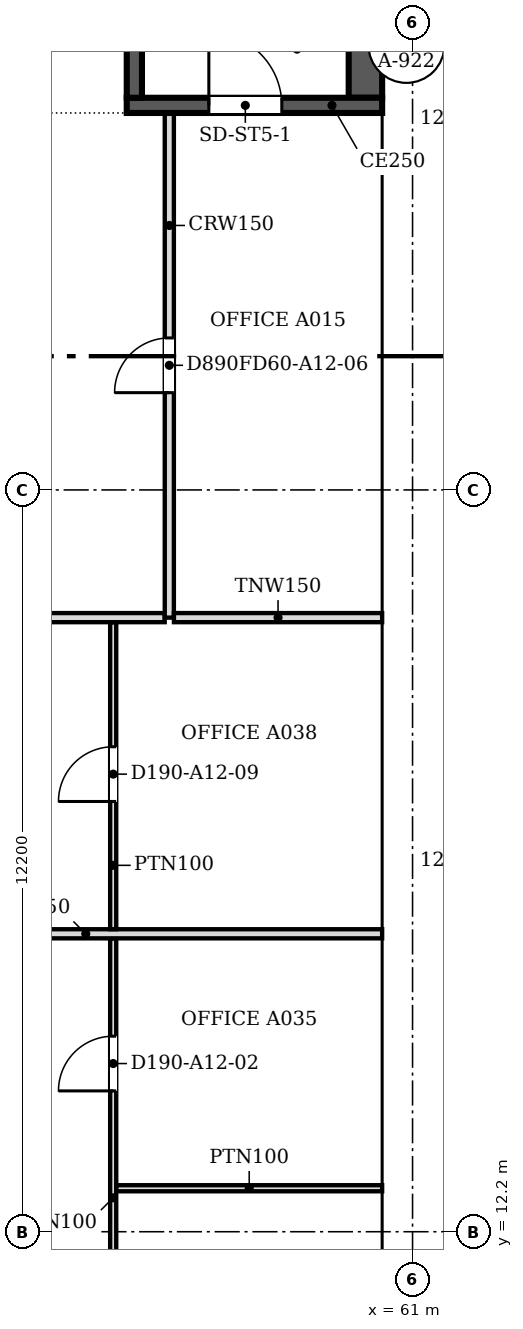
"""IFC4 building model, lengths in metres.
Left out: names, types, materials, properties, quantities, classifications, styles, units other than length and angle.
Written with IfcOpenShell. Run it as: python <this file> out.ifc"""

import sys

from ifc_helpers import new_model, si_unit, direction, frame, frame_2d, origin, place, context, subcontext, project, spatial, polyline, rectangle, outline, extrude, faceted_brep, source, transform, mapped, element, fill, save


model = new_model("IFC4")
c1 = context("Model", 3, precision=1e-05, world=origin(), true_north=direction((0.0, 1.0)))
c2 = subcontext(c1, "Body", "Model", "MODEL_VIEW")
j1 = project(units=[si_unit("LENGTHUNIT", "METRE"), si_unit("PLANEANGLEUNIT", "RADIAN")], contexts=[c1])
p1 = place(None, origin())
s1 = spatial("IfcSite", under=j1, at=p1, CompositionType="ELEMENT")
p2 = place(p1, origin())
s2 = spatial("IfcBuilding", under=s1, at=p2, CompositionType="ELEMENT")
p3 = place(p2, frame((0.0, 0.0, 139.2)))
s3 = spatial("IfcBuildingStorey", under=s2, at=p3, CompositionType="ELEMENT", Elevation=139.2)
m1 = source(origin(), c2, "Body", "SweptSolid", [
    extrude(outline(polyline([(3.05, 0.0), (6.1, 3.8), (3.05, 7.6), (0.0, 3.8), (3.05, 0.0)])), frame((0.0, 0.25, 0.0), z_axis=(0.0, -1.0, 0.0), x_axis=(1.0, 0.0, 0.0)), (0.0, 0.0, 1.0), 0.5),
])
p4 = place(p3, frame((60.75, 9.15, -3.8), z_axis=(0.0, 0.0, 1.0), x_axis=(0.0, 1.0, 0.0)))
e1 = element("IfcWall", 1, at=p4, inside=s3, PredefinedType="SOLIDWALL", context=c2, shape_type="MappedRepresentation", body=[
    mapped(m1, transform((0.0, 0.0, 0.0), scale=1.0)),
])
m2 = source(origin(), c2, "Body", "SweptSolid", [
    extrude(outline(polyline([(3.05, 0.399), (5.78, 3.8), (3.05, 7.201), (0.321, 3.8), (3.05, 0.399)])), frame((0.0, 0.26, 0.0), z_axis=(0.0, -1.0, 0.0), x_axis=(1.0, 0.0, 0.0)), (0.0, 0.0, 1.0), 0.52),
])
p5 = place(p4, origin())
e2 = element("IfcOpeningElement", 2, at=p5, cuts=e1, PredefinedType="OPENING", context=c2, shape_type="MappedRepresentation", body=[
    mapped(m2, transform((0.0, 0.0, 0.0), scale=1.0)),
])
p6 = place(p3, frame((60.75, 15.25, -3.8), z_axis=(0.0, 0.0, 1.0), x_axis=(0.0, 1.0, 0.0)))
e3 = element("IfcWall", 3, at=p6, inside=s3, PredefinedType="SOLIDWALL", context=c2, shape_type="MappedRepresentation", body=[
    mapped(m1, transform((0.0, 0.0, 0.0), scale=1.0)),
])
p7 = place(p6, origin())
e4 = element("IfcOpeningElement", 4, at=p7, cuts=e3, PredefinedType="OPENING", context=c2, shape_type="MappedRepresentation", body=[
    mapped(m2, transform((0.0, 0.0, 0.0), scale=1.0)),
])
m3 = source(origin(), c2, "Body", "Brep", [
    faceted_brep([(3.05, -0.25, 0.0), (6.1, -0.25, 3.8), (6.1, -0.25, 3.8), (3.05, -0.25, 7.6), (0.0, -0.25, 3.8), (0.0, 0.25, 3.8), (3.05, 0.25, 7.6), (6.1, 0.25, 3.8), (6.1, 0.25, 3.8), (3.05, 0.25, 0.0)], [[[0, 1, 2, 3, 4]], [[5, 6, 7, 8, 9]], [[9, 8, 1, 0]], [[7, 6, 3, 2]], [[6, 5, 4, 3]], [[5, 9, 0, 4]], [[1, 8, 7, 2]]]),
])
p8 = place(p3, frame((60.75, 21.35, -3.8), z_axis=(0.0, 0.0, 1.0), x_axis=(0.0, 1.0, 0.0)))
e5 = element("IfcWall", 5, at=p8, inside=s3, PredefinedType="SOLIDWALL", context=c2, shape_type="MappedRepresentation", body=[
    mapped(m3, transform((0.0, 0.0, 0.0), scale=1.0)),
])
p9 = place(p8, origin())
e6 = element("IfcOpeningElement", 6, at=p9, cuts=e5, PredefinedType="OPENING", context=c2, shape_type="MappedRepresentation", body=[
    mapped(m2, transform((0.0, 0.0, 0.0), scale=1.0)),
])
p10 = place(p3, frame((60.75, 27.45, -3.8), z_axis=(0.0, 0.0, 1.0), x_axis=(0.0, 1.0, 0.0)))
e7 = element("IfcWall", 7, at=p10, inside=s3, PredefinedType="SOLIDWALL", context=c2, shape_type="MappedRepresentation", body=[
    mapped(m1, transform((0.0, 0.0, 0.0), scale=1.0)),
])
p11 = place(p10, origin())
e8 = element("IfcOpeningElement", 8, at=p11, cuts=e7, PredefinedType="OPENING", context=c2, shape_type="MappedRepresentation", body=[
    mapped(m2, transform((0.0, 0.0, 0.0), scale=1.0)),
])
p12 = place(p2, frame((0.0, 0.0, 143.0)))
s4 = spatial("IfcBuildingStorey", under=s2, at=p12, CompositionType="ELEMENT", Elevation=143.0)
m4 = source(origin(), c2, "Body", "Brep", [
    faceted_brep([(3.003, -0.25, 0.0), (6.053, -0.25, 3.8), (3.003, -0.25, 7.6), (0.0, -0.25, 3.8), (0.047, 0.25, 3.859), (3.003, 0.25, 7.6), (6.053, 0.25, 3.8), (3.003, 0.25, 0.0), (0.047, 0.25, 3.741), (0.0, 0.0, 3.8)], [[[0, 1, 2, 3]], [[4, 5, 6, 7, 8]], [[7, 6, 1, 0]], [[6, 5, 2, 1]], [[5, 4, 9, 3, 2]], [[8, 7, 0, 3, 9]], [[8, 9, 4]]]),
])
p13 = place(p12, frame((60.75, 6.146, -3.8), z_axis=(0.0, 0.0, 1.0), x_axis=(0.0, 1.0, 0.0)))
e9 = element("IfcWall", 9, at=p13, inside=s4, PredefinedType="SOLIDWALL", context=c2, shape_type="MappedRepresentation", body=[
    mapped(m4, transform((0.0, 0.0, 0.0), scale=1.0)),
])
m5 = source(origin(), c2, "Body", "SweptSolid", [
    extrude(outline(polyline([(3.005, 0.401), (5.733, 3.8), (3.005, 7.199), (0.319, 3.8), (3.005, 0.401)])), frame((0.0, 0.26, 0.0), z_axis=(0.0, -1.0, 0.0), x_axis=(1.0, 0.0, 0.0)), (0.0, 0.0, 1.0), 0.52),
])
p14 = place(p13, origin())
e10 = element("IfcOpeningElement", 10, at=p14, cuts=e9, PredefinedType="OPENING", context=c2, shape_type="MappedRepresentation", body=[
    mapped(m5, transform((0.0, 0.0, 0.0), scale=1.0)),
])
p15 = place(p12, frame((60.75, 12.2, -3.8), z_axis=(0.0, 0.0, 1.0), x_axis=(0.0, 1.0, 0.0)))
e11 = element("IfcWall", 11, at=p15, inside=s4, PredefinedType="SOLIDWALL", context=c2, shape_type="MappedRepresentation", body=[
    mapped(m1, transform((0.0, 0.0, 0.0), scale=1.0)),
])
p16 = place(p15, origin())
e12 = element("IfcOpeningElement", 12, at=p16, cuts=e11, PredefinedType="OPENING", context=c2, shape_type="MappedRepresentation", body=[
    mapped(m2, transform((0.0, 0.0, 0.0), scale=1.0)),
])
p17 = place(p12, frame((60.75, 18.3, -3.8), z_axis=(0.0, 0.0, 1.0), x_axis=(0.0, 1.0, 0.0)))
e13 = element("IfcWall", 13, at=p17, inside=s4, PredefinedType="SOLIDWALL", context=c2, shape_type="MappedRepresentation", body=[
    mapped(m3, transform((0.0, 0.0, 0.0), scale=1.0)),
])
p18 = place(p17, origin())
e14 = element("IfcOpeningElement", 14, at=p18, cuts=e13, PredefinedType="OPENING", context=c2, shape_type="MappedRepresentation", body=[
    mapped(m2, transform((0.0, 0.0, 0.0), scale=1.0)),
])
p19 = place(p12, frame((60.75, 24.4, -3.8), z_axis=(0.0, 0.0, 1.0), x_axis=(0.0, 1.0, 0.0)))
e15 = element("IfcWall", 15, at=p19, inside=s4, PredefinedType="SOLIDWALL", context=c2, shape_type="MappedRepresentation", body=[
    mapped(m1, transform((0.0, 0.0, 0.0), scale=1.0)),
])
p20 = place(p19, origin())
e16 = element("IfcOpeningElement", 16, at=p20, cuts=e15, PredefinedType="OPENING", context=c2, shape_type="MappedRepresentation", body=[
    mapped(m2, transform((0.0, 0.0, 0.0), scale=1.0)),
])
p21 = place(p12, frame((60.75, 30.5, -3.8), z_axis=(0.0, 0.0, 1.0), x_axis=(0.0, 1.0, 0.0)))
e17 = element("IfcWall", 17, at=p21, inside=s4, PredefinedType="SOLIDWALL", context=c2, shape_type="MappedRepresentation", body=[
    mapped(m1, transform((0.0, 0.0, 0.0), scale=1.0)),
])
p22 = place(p21, origin())
e18 = element("IfcOpeningElement", 18, at=p22, cuts=e17, PredefinedType="OPENING", context=c2, shape_type="MappedRepresentation", body=[
    mapped(m2, transform((0.0, 0.0, 0.0), scale=1.0)),
])
p23 = place(p3, frame((60.5, 30.725, 0.0), z_axis=(0.0, 0.0, 1.0), x_axis=(-1.0, 0.0, 0.0)))
e19 = element("IfcWall", 19, at=p23, inside=s3, PredefinedType="SOLIDWALL", context=c2, shape_type="SweptSolid", body=[
    extrude(rectangle(XDim=4.2, YDim=0.25, at=frame_2d((2.1, 0.0))), origin(), (0.0, 0.0, 1.0), 3.8),
])
m6 = source(origin(), c2, "Body", "SweptSolid", [
    extrude(rectangle(XDim=1.2, YDim=2.1, at=frame_2d((0.6, 1.05))), frame((0.0, 0.135, 0.0), z_axis=(0.0, -1.0, 0.0), x_axis=(1.0, 0.0, 0.0)), (0.0, 0.0, 1.0), 0.27),
])
p24 = place(p23, frame((1.65, 0.0, 0.0)))
e20 = element("IfcOpeningElement", 20, at=p24, cuts=e19, PredefinedType="OPENING", context=c2, shape_type="MappedRepresentation", body=[
    mapped(m6, transform((0.0, 0.0, 0.0), scale=1.0)),
])
p25 = place(p3, frame((56.425, 30.85, 0.0), z_axis=(0.0, 0.0, 1.0), x_axis=(0.0, 1.0, 0.0)))
e21 = element("IfcWall", 21, at=p25, inside=s3, PredefinedType="SOLIDWALL", context=c2, shape_type="SweptSolid", body=[
    extrude(rectangle(XDim=8.0, YDim=0.25, at=frame_2d((4.0, 0.0))), origin(), (0.0, 0.0, 1.0), 3.8),
])
p26 = place(p3, frame((60.225, 38.85, 0.0), z_axis=(0.0, 0.0, 1.0), x_axis=(0.0, -1.0, 0.0)))
e22 = element("IfcWall", 22, at=p26, inside=s3, PredefinedType="SOLIDWALL", context=c2, shape_type="SweptSolid", body=[
    extrude(rectangle(XDim=8.0, YDim=0.55, at=frame_2d((4.0, 0.0))), origin(), (0.0, 0.0, 1.0), 3.8),
])
p27 = place(p3, frame((56.077, 17.024, 0.0), z_axis=(0.0, 0.0, 1.0), x_axis=(0.0, -1.0, 0.0)))
e23 = element("IfcWall", 23, at=p27, inside=s3, PredefinedType="PARTITIONING", context=c2, shape_type="SweptSolid", body=[
    extrude(rectangle(XDim=8.924, YDim=0.1, at=frame_2d((4.462, 0.0))), origin(), (0.0, 0.0, 1.0), 3.067),
])
m7 = source(origin(), c2, "Body", "SweptSolid", [
    extrude(rectangle(XDim=0.9, YDim=2.1, at=frame_2d((0.45, 1.05))), frame((0.0, 0.06, 0.0), z_axis=(0.0, -1.0, 0.0), x_axis=(1.0, 0.0, 0.0)), (0.0, 0.0, 1.0), 0.12),
])
p28 = place(p27, frame((1.608, 0.0, 0.0)))
e24 = element("IfcOpeningElement", 24, at=p28, cuts=e23, PredefinedType="OPENING", context=c2, shape_type="MappedRepresentation", body=[
    mapped(m7, transform((0.0, 0.0, 0.0), scale=1.0)),
])
p29 = place(p27, frame((6.024, 0.0, 0.0)))
e25 = element("IfcOpeningElement", 25, at=p29, cuts=e23, PredefinedType="OPENING", context=c2, shape_type="MappedRepresentation", body=[
    mapped(m7, transform((0.0, 0.0, 0.0), scale=1.0)),
])
p30 = place(p3, frame((56.128, 12.915, 0.0), z_axis=(0.0, 0.0, 1.0), x_axis=(1.0, 0.0, 0.0)))
e26 = element("IfcWall", 26, at=p30, inside=s3, PredefinedType="PARTITIONING", context=c2, shape_type="SweptSolid", body=[
    extrude(rectangle(XDim=4.372, YDim=0.1, at=frame_2d((2.186, 0.0))), origin(), (0.0, 0.0, 1.0), 3.067),
])
p31 = place(p3, frame((50.751, 17.1, 0.0), z_axis=(0.0, 0.0, 1.0), x_axis=(1.0, 0.0, 0.0)))
e27 = element("IfcWall", 27, at=p31, inside=s3, PredefinedType="PARTITIONING", context=c2, shape_type="SweptSolid", body=[
    extrude(rectangle(XDim=9.749, YDim=0.15, at=frame_2d((4.875, 0.0))), origin(), (0.0, 0.0, 1.0), 3.067),
])
p32 = place(p3, frame((56.077, 22.224, 0.0), z_axis=(0.0, 0.0, 1.0), x_axis=(0.0, -1.0, 0.0)))
e28 = element("IfcWall", 28, at=p32, inside=s3, PredefinedType="PARTITIONING", context=c2, shape_type="SweptSolid", body=[
    extrude(rectangle(XDim=5.048, YDim=0.1, at=frame_2d((2.524, 0.0))), origin(), (0.0, 0.0, 1.0), 3.067),
])
p33 = place(p32, frame((2.048, 0.0, 0.0)))
e29 = element("IfcOpeningElement", 29, at=p33, cuts=e28, PredefinedType="OPENING", context=c2, shape_type="MappedRepresentation", body=[
    mapped(m7, transform((0.0, 0.0, 0.0), scale=1.0)),
])
p34 = place(p3, frame((47.476, 22.3, 0.0), z_axis=(0.0, 0.0, 1.0), x_axis=(1.0, 0.0, 0.0)))
e30 = element("IfcWall", 30, at=p34, inside=s3, PredefinedType="PARTITIONING", context=c2, shape_type="SweptSolid", body=[
    extrude(rectangle(XDim=9.448, YDim=0.15, at=frame_2d((4.724, 0.0))), origin(), (0.0, 0.0, 1.0), 3.067),
])
p35 = place(p3, frame((57.0, 30.6, 0.0), z_axis=(0.0, 0.0, 1.0), x_axis=(0.0, -1.0, 0.0)))
e31 = element("IfcWall", 31, at=p35, inside=s3, PredefinedType="PARTITIONING", context=c2, shape_type="SweptSolid", body=[
    extrude(rectangle(XDim=8.3, YDim=0.15, at=frame_2d((4.15, 0.0))), origin(), (0.0, 0.0, 1.0), 3.067),
])
m8 = source(origin(), c2, "Body", "SweptSolid", [
    extrude(rectangle(XDim=0.9, YDim=2.1, at=frame_2d((0.45, 1.05))), frame((0.0, 0.085, 0.0), z_axis=(0.0, -1.0, 0.0), x_axis=(1.0, 0.0, 0.0)), (0.0, 0.0, 1.0), 0.17),
])
p36 = place(p35, frame((3.7, 0.0, 0.0)))
e32 = element("IfcOpeningElement", 32, at=p36, cuts=e31, PredefinedType="OPENING", context=c2, shape_type="MappedRepresentation", body=[
    mapped(m8, transform((0.0, 0.0, 0.0), scale=1.0)),
])
p37 = place(p3, frame((57.076, 22.3, 0.0), z_axis=(0.0, 0.0, 1.0), x_axis=(1.0, 0.0, 0.0)))
e33 = element("IfcWall", 33, at=p37, inside=s3, PredefinedType="PARTITIONING", context=c2, shape_type="SweptSolid", body=[
    extrude(rectangle(XDim=3.424, YDim=0.15, at=frame_2d((1.712, 0.0))), origin(), (0.0, 0.0, 1.0), 3.067),
])
m9 = source(origin(), c2, "Body", "SweptSolid", [
    extrude(rectangle(XDim=1.2, YDim=2.1, at=frame_2d((0.6, 1.05))), frame((0.0, 0.025, 0.0), z_axis=(0.0, -1.0, 0.0), x_axis=(1.0, 0.0, 0.0)), (0.0, 0.0, 1.0), 0.05),
])
p38 = place(p24, origin())
e34 = element("IfcDoor", 34, at=p38, inside=s3, OperationType="SINGLE_SWING_RIGHT", PredefinedType="DOOR", context=c2, shape_type="MappedRepresentation", body=[
    mapped(m9, transform((0.0, 0.0, 0.0), scale=1.0)),
])
fill(e20, e34)
m10 = source(origin(), c2, "Body", "SweptSolid", [
    extrude(rectangle(XDim=0.9, YDim=2.1, at=frame_2d((0.45, 1.05))), frame((0.0, 0.025, 0.0), z_axis=(0.0, -1.0, 0.0), x_axis=(1.0, 0.0, 0.0)), (0.0, 0.0, 1.0), 0.05),
])
p39 = place(p28, origin())
e35 = element("IfcDoor", 35, at=p39, inside=s3, OperationType="SINGLE_SWING_RIGHT", PredefinedType="DOOR", context=c2, shape_type="MappedRepresentation", body=[
    mapped(m10, transform((0.0, 0.0, 0.0), scale=1.0)),
])
fill(e24, e35)
p40 = place(p33, origin())
e36 = element("IfcDoor", 36, at=p40, inside=s3, OperationType="SINGLE_SWING_RIGHT", PredefinedType="DOOR", context=c2, shape_type="MappedRepresentation", body=[
    mapped(m10, transform((0.0, 0.0, 0.0), scale=1.0)),
])
fill(e29, e36)
p41 = place(p36, origin())
e37 = element("IfcDoor", 37, at=p41, inside=s3, OperationType="SINGLE_SWING_RIGHT", PredefinedType="DOOR", context=c2, shape_type="MappedRepresentation", body=[
    mapped(m10, transform((0.0, 0.0, 0.0), scale=1.0)),
])
fill(e32, e37)
save(model, sys.argv[1])
